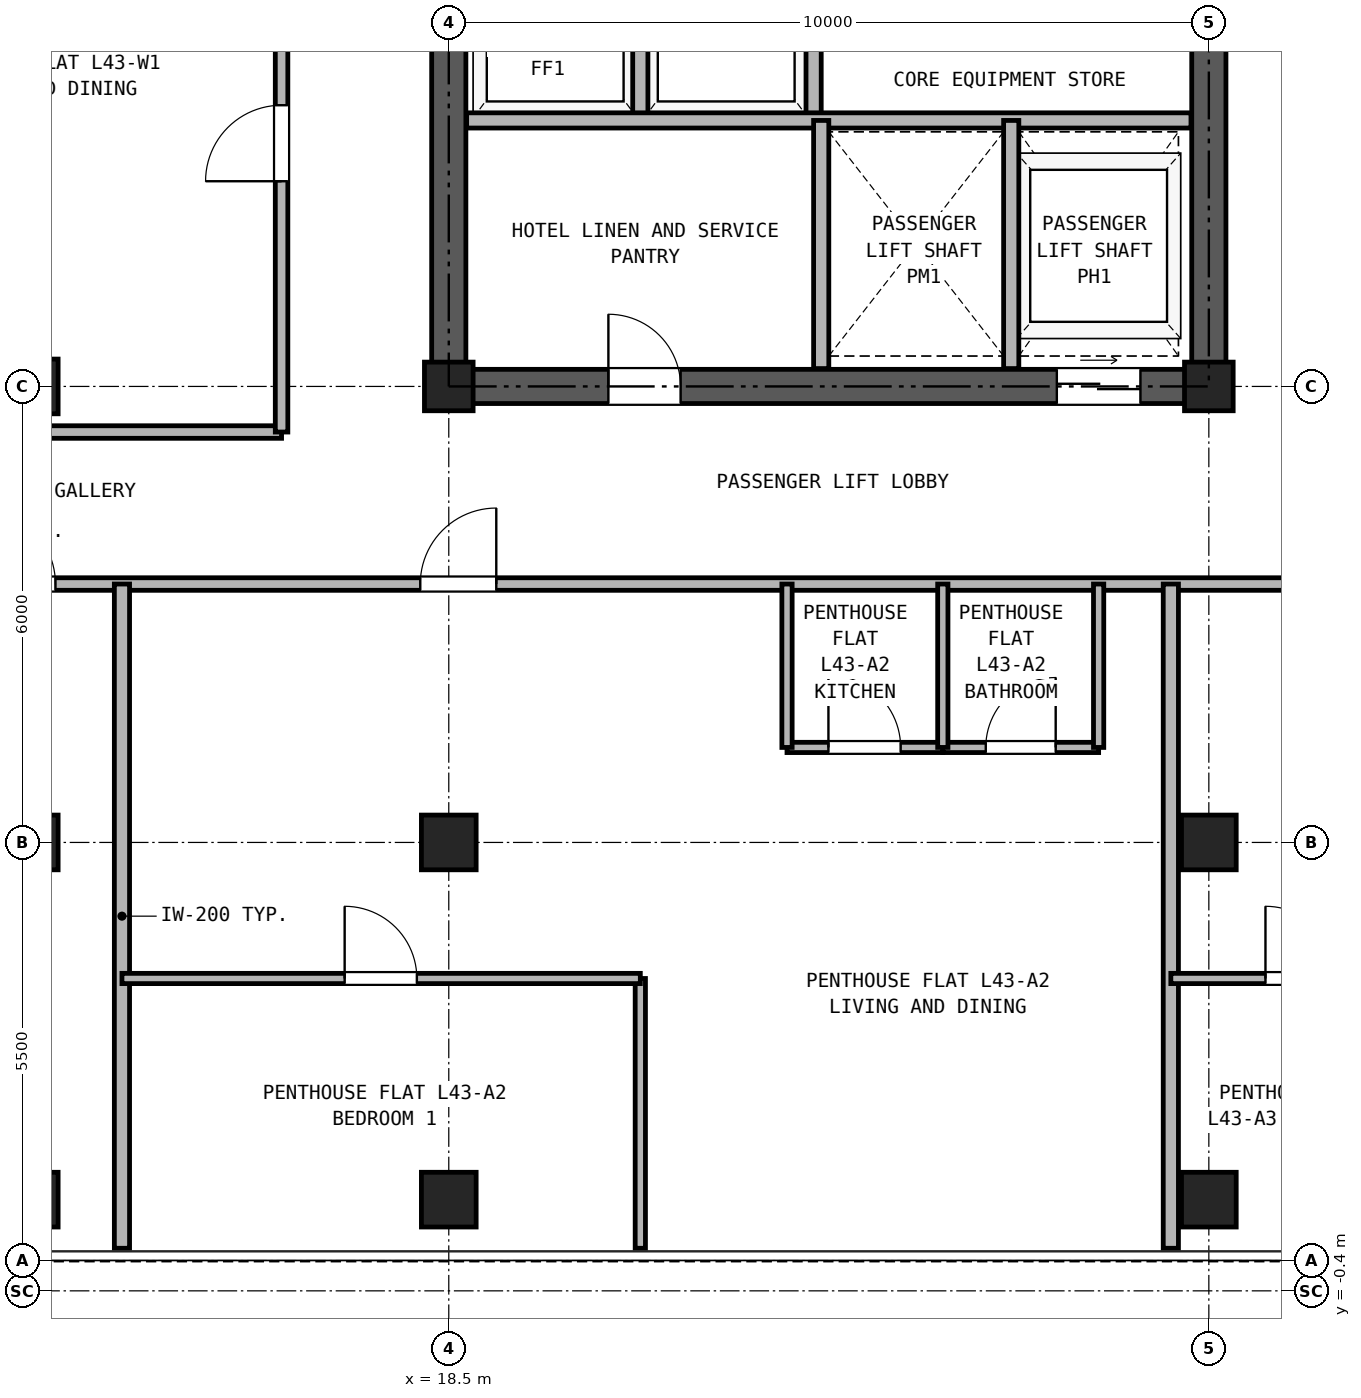
"""IFC4 building model, lengths in metres.
Left out: names, types, materials, properties, quantities, classifications, styles, units other than length and angle.
Written with IfcOpenShell. Run it as: python <this file> out.ifc"""

import sys

from ifc_helpers import new_model, si_unit, direction, frame, frame_2d, origin, origin_2d, place, context, subcontext, project, spatial, rectangle, hollow_rectangle, extrude, source, transform, mapped, element, fill, save


model = new_model("IFC4")
c1 = context("Model", 3, precision=1e-05, world=origin(), true_north=direction((0.0, 1.0)))
c2 = subcontext(c1, "Body", "Model", "MODEL_VIEW")
j1 = project(units=[si_unit("LENGTHUNIT", "METRE"), si_unit("PLANEANGLEUNIT", "RADIAN")], contexts=[c1])
p1 = place(None, origin())
s1 = spatial("IfcSite", under=j1, at=p1, CompositionType="ELEMENT")
p2 = place(p1, origin())
s2 = spatial("IfcBuilding", under=s1, at=p2, CompositionType="ELEMENT")
p3 = place(p2, frame((0.0, 0.0, 156.1)))
s3 = spatial("IfcBuildingStorey", under=s2, at=p3, CompositionType="ELEMENT", Elevation=156.1)
m1 = source(origin(), c2, "Body", "SweptSolid", [
    extrude(hollow_rectangle(XDim=0.72, YDim=0.72, WallThickness=0.04, at=origin_2d()), origin(), (0.0, 0.0, 1.0), 2.95),
])
for number, where, z_axis, x_axis in (
    (1, (13.0, 0.8, 0.0), (0.0, 0.0, 1.0), (1.0, 0.0, 0.0)),
    (2, (18.5, 0.8, 0.0), (0.0, 0.0, 1.0), (1.0, 0.0, 0.0)),
    (3, (28.5, 0.8, 0.0), (0.0, 0.0, 1.0), (1.0, 0.0, 0.0)),
    (4, (13.0, 5.5, 0.0), (0.0, 0.0, 1.0), (1.0, 0.0, 0.0)),
    (5, (13.0, 11.5, 0.0), (0.0, 0.0, 1.0), (1.0, 0.0, 0.0)),
    (6, (18.5, 5.5, 0.0), (0.0, 0.0, 1.0), (1.0, 0.0, 0.0)),
):
    element("IfcColumn", number, at=place(p3, frame(where, z_axis=z_axis, x_axis=x_axis)), inside=s3, PredefinedType="COLUMN", context=c2, shape_type="MappedRepresentation", body=[
        mapped(m1, transform((0.0, 0.0, 0.0), x_axis=(1.0, 0.0, 0.0), y_axis=(0.0, 1.0, 0.0), z_axis=(0.0, 0.0, 1.0), scale=1.0)),
    ])
m2 = source(origin(), c2, "Body", "SweptSolid", [
    extrude(hollow_rectangle(XDim=0.64, YDim=0.64, WallThickness=0.035, at=origin_2d()), origin(), (0.0, 0.0, 1.0), 2.95),
])
p4 = place(p3, frame((18.5, 11.5, 0.0), z_axis=(0.0, 0.0, 1.0), x_axis=(1.0, 0.0, 0.0)))
e7 = element("IfcColumn", 7, at=p4, inside=s3, PredefinedType="COLUMN", context=c2, shape_type="MappedRepresentation", body=[
    mapped(m2, transform((0.0, 0.0, 0.0), x_axis=(1.0, 0.0, 0.0), y_axis=(0.0, 1.0, 0.0), z_axis=(0.0, 0.0, 1.0), scale=1.0)),
])
p5 = place(p3, frame((28.5, 5.5, 0.0), z_axis=(0.0, 0.0, 1.0), x_axis=(1.0, 0.0, 0.0)))
e8 = element("IfcColumn", 8, at=p5, inside=s3, PredefinedType="COLUMN", context=c2, shape_type="MappedRepresentation", body=[
    mapped(m1, transform((0.0, 0.0, 0.0), x_axis=(1.0, 0.0, 0.0), y_axis=(0.0, 1.0, 0.0), z_axis=(0.0, 0.0, 1.0), scale=1.0)),
])
p6 = place(p3, frame((28.5, 11.5, 0.0), z_axis=(0.0, 0.0, 1.0), x_axis=(1.0, 0.0, 0.0)))
e9 = element("IfcColumn", 9, at=p6, inside=s3, PredefinedType="COLUMN", context=c2, shape_type="MappedRepresentation", body=[
    mapped(m2, transform((0.0, 0.0, 0.0), x_axis=(1.0, 0.0, 0.0), y_axis=(0.0, 1.0, 0.0), z_axis=(0.0, 0.0, 1.0), scale=1.0)),
])
p7 = place(p3, frame((18.275, 11.5, 0.0), z_axis=(0.0, 0.0, 1.0), x_axis=(1.0, 0.0, 0.0)))
e10 = element("IfcWall", 10, at=p7, inside=s3, PredefinedType="SHEAR", context=c2, shape_type="SweptSolid", body=[
    extrude(rectangle(XDim=10.45, YDim=0.45, at=frame_2d((5.225, 0.0))), origin(), (0.0, 0.0, 1.0), 2.95),
])
p8 = place(p7, frame((2.325, 0.0, 0.0)))
e11 = element("IfcOpeningElement", 11, at=p8, cuts=e10, PredefinedType="OPENING", context=c2, shape_type="SweptSolid", body=[
    extrude(rectangle(XDim=0.95, YDim=2.15, at=frame_2d((0.475, 1.075))), frame((0.0, 0.235, 0.0), z_axis=(0.0, -1.0, 0.0), x_axis=(1.0, 0.0, 0.0)), (0.0, 0.0, 1.0), 0.47),
])
p9 = place(p7, frame((8.225, 0.0, 0.0)))
e12 = element("IfcOpeningElement", 12, at=p9, cuts=e10, PredefinedType="OPENING", context=c2, shape_type="SweptSolid", body=[
    extrude(rectangle(XDim=1.1, YDim=2.25, at=frame_2d((0.55, 1.125))), frame((0.0, 0.235, 0.0), z_axis=(0.0, -1.0, 0.0), x_axis=(1.0, 0.0, 0.0)), (0.0, 0.0, 1.0), 0.47),
])
p10 = place(p3, frame((18.5, 11.725, 0.0), z_axis=(0.0, 0.0, 1.0), x_axis=(0.0, 1.0, 0.0)))
e13 = element("IfcWall", 13, at=p10, inside=s3, PredefinedType="SHEAR", context=c2, shape_type="SweptSolid", body=[
    extrude(rectangle(XDim=16.8, YDim=0.45, at=frame_2d((8.4, 0.0))), origin(), (0.0, 0.0, 1.0), 2.95),
])
p11 = place(p10, frame((7.425, 0.0, 0.0)))
e14 = element("IfcOpeningElement", 14, at=p11, cuts=e13, PredefinedType="OPENING", context=c2, shape_type="SweptSolid", body=[
    extrude(rectangle(XDim=1.15, YDim=2.2, at=frame_2d((0.575, 1.1))), frame((0.0, 0.235, 0.0), z_axis=(0.0, -1.0, 0.0), x_axis=(1.0, 0.0, 0.0)), (0.0, 0.0, 1.0), 0.47),
])
p12 = place(p3, frame((28.5, 11.725, 0.0), z_axis=(0.0, 0.0, 1.0), x_axis=(0.0, 1.0, 0.0)))
e15 = element("IfcWall", 15, at=p12, inside=s3, PredefinedType="SHEAR", context=c2, shape_type="SweptSolid", body=[
    extrude(rectangle(XDim=16.8, YDim=0.45, at=frame_2d((8.4, 0.0))), origin(), (0.0, 0.0, 1.0), 2.95),
])
p13 = place(p12, frame((7.425, 0.0, 0.0)))
e16 = element("IfcOpeningElement", 16, at=p13, cuts=e15, PredefinedType="OPENING", context=c2, shape_type="SweptSolid", body=[
    extrude(rectangle(XDim=1.15, YDim=2.2, at=frame_2d((0.575, 1.1))), frame((0.0, 0.235, 0.0), z_axis=(0.0, -1.0, 0.0), x_axis=(1.0, 0.0, 0.0)), (0.0, 0.0, 1.0), 0.47),
])
for number, where, z_axis, x_axis in (
    (17, (21.02, 15.0, 0.0), (0.0, 0.0, 1.0), (0.0, 1.0, 0.0)),
    (18, (23.3, 15.0, 0.0), (0.0, 0.0, 1.0), (0.0, 1.0, 0.0)),
):
    element("IfcWall", number, at=place(p3, frame(where, z_axis=z_axis, x_axis=x_axis)), inside=s3, PredefinedType="PARTITIONING", context=c2, shape_type="SweptSolid", body=[
        extrude(rectangle(XDim=3.0, YDim=0.2, at=frame_2d((1.5, 0.0))), origin(), (0.0, 0.0, 1.0), 2.95),
    ])
p14 = place(p3, frame((18.735, 15.0, 0.0), z_axis=(0.0, 0.0, 1.0), x_axis=(1.0, 0.0, 0.0)))
e19 = element("IfcWall", 19, at=p14, inside=s3, PredefinedType="PARTITIONING", context=c2, shape_type="SweptSolid", body=[
    extrude(rectangle(XDim=9.53, YDim=0.2, at=frame_2d((4.765, 0.0))), origin(), (0.0, 0.0, 1.0), 2.95),
])
for number, where, z_axis, x_axis in (
    (20, (23.4, 11.735, 0.0), (0.0, 0.0, 1.0), (0.0, 1.0, 0.0)),
    (21, (25.9, 11.735, 0.0), (0.0, 0.0, 1.0), (0.0, 1.0, 0.0)),
):
    element("IfcWall", number, at=place(p3, frame(where, z_axis=z_axis, x_axis=x_axis)), inside=s3, PredefinedType="PARTITIONING", context=c2, shape_type="SweptSolid", body=[
        extrude(rectangle(XDim=3.265, YDim=0.2, at=frame_2d((1.632, 0.0))), origin(), (0.0, 0.0, 1.0), 2.95),
    ])
p15 = place(p3, frame((0.16, 8.9, 0.0), z_axis=(0.0, 0.0, 1.0), x_axis=(1.0, 0.0, 0.0)))
e22 = element("IfcWall", 22, at=p15, inside=s3, PredefinedType="PARTITIONING", context=c2, shape_type="SweptSolid", body=[
    extrude(rectangle(XDim=41.48, YDim=0.165, at=frame_2d((20.74, 0.0))), origin(), (0.0, 0.0, 1.0), 2.95),
])
p16 = place(p15, frame((12.165, 0.0, 0.0)))
e23 = element("IfcOpeningElement", 23, at=p16, cuts=e22, PredefinedType="OPENING", context=c2, shape_type="SweptSolid", body=[
    extrude(rectangle(XDim=1.0, YDim=2.15, at=frame_2d((0.5, 1.075))), frame((0.0, 0.093, 0.0), z_axis=(0.0, -1.0, 0.0), x_axis=(1.0, 0.0, 0.0)), (0.0, 0.0, 1.0), 0.185),
])
p17 = place(p15, frame((17.965, 0.0, 0.0)))
e24 = element("IfcOpeningElement", 24, at=p17, cuts=e22, PredefinedType="OPENING", context=c2, shape_type="SweptSolid", body=[
    extrude(rectangle(XDim=1.0, YDim=2.15, at=frame_2d((0.5, 1.075))), frame((0.0, 0.093, 0.0), z_axis=(0.0, -1.0, 0.0), x_axis=(1.0, 0.0, 0.0)), (0.0, 0.0, 1.0), 0.185),
])
p18 = place(p15, frame((31.115, 0.0, 0.0)))
e25 = element("IfcOpeningElement", 25, at=p18, cuts=e22, PredefinedType="OPENING", context=c2, shape_type="SweptSolid", body=[
    extrude(rectangle(XDim=1.0, YDim=2.15, at=frame_2d((0.5, 1.075))), frame((0.0, 0.093, 0.0), z_axis=(0.0, -1.0, 0.0), x_axis=(1.0, 0.0, 0.0)), (0.0, 0.0, 1.0), 0.185),
])
p19 = place(p3, frame((7.6, 10.9, 0.0), z_axis=(0.0, 0.0, 1.0), x_axis=(1.0, 0.0, 0.0)))
e26 = element("IfcWall", 26, at=p19, inside=s3, PredefinedType="PARTITIONING", context=c2, shape_type="SweptSolid", body=[
    extrude(rectangle(XDim=8.7, YDim=0.165, at=frame_2d((4.35, 0.0))), origin(), (0.0, 0.0, 1.0), 2.95),
])
p20 = place(p3, frame((16.3, 10.9, 0.0), z_axis=(0.0, 0.0, 1.0), x_axis=(0.0, 1.0, 0.0)))
e27 = element("IfcWall", 27, at=p20, inside=s3, PredefinedType="PARTITIONING", context=c2, shape_type="SweptSolid", body=[
    extrude(rectangle(XDim=24.24, YDim=0.165, at=frame_2d((12.12, 0.0))), origin(), (0.0, 0.0, 1.0), 2.95),
])
p21 = place(p20, frame((3.3, 0.0, 0.0)))
e28 = element("IfcOpeningElement", 28, at=p21, cuts=e27, PredefinedType="OPENING", context=c2, shape_type="SweptSolid", body=[
    extrude(rectangle(XDim=1.0, YDim=2.15, at=frame_2d((0.5, 1.075))), frame((0.0, 0.093, 0.0), z_axis=(0.0, -1.0, 0.0), x_axis=(1.0, 0.0, 0.0)), (0.0, 0.0, 1.0), 0.185),
])
p22 = place(p20, frame((11.25, 0.0, 0.0)))
e29 = element("IfcOpeningElement", 29, at=p22, cuts=e27, PredefinedType="OPENING", context=c2, shape_type="SweptSolid", body=[
    extrude(rectangle(XDim=1.0, YDim=2.15, at=frame_2d((0.5, 1.075))), frame((0.0, 0.093, 0.0), z_axis=(0.0, -1.0, 0.0), x_axis=(1.0, 0.0, 0.0)), (0.0, 0.0, 1.0), 0.185),
])
p23 = place(p20, frame((17.2, 0.0, 0.0)))
e30 = element("IfcOpeningElement", 30, at=p23, cuts=e27, PredefinedType="OPENING", context=c2, shape_type="SweptSolid", body=[
    extrude(rectangle(XDim=1.0, YDim=2.15, at=frame_2d((0.5, 1.075))), frame((0.0, 0.093, 0.0), z_axis=(0.0, -1.0, 0.0), x_axis=(1.0, 0.0, 0.0)), (0.0, 0.0, 1.0), 0.185),
])
p24 = place(p3, frame((14.2, 0.16, 0.0), z_axis=(0.0, 0.0, 1.0), x_axis=(0.0, 1.0, 0.0)))
e31 = element("IfcWall", 31, at=p24, inside=s3, PredefinedType="PARTITIONING", context=c2, shape_type="SweptSolid", body=[
    extrude(rectangle(XDim=8.74, YDim=0.2, at=frame_2d((4.37, 0.0))), origin(), (0.0, 0.0, 1.0), 2.95),
])
p25 = place(p3, frame((22.95, 6.75, 0.0), z_axis=(0.0, 0.0, 1.0), x_axis=(1.0, 0.0, 0.0)))
e32 = element("IfcWall", 32, at=p25, inside=s3, PredefinedType="PARTITIONING", context=c2, shape_type="SweptSolid", body=[
    extrude(rectangle(XDim=2.05, YDim=0.135, at=frame_2d((1.025, 0.0))), origin(), (0.0, 0.0, 1.0), 2.95),
])
p26 = place(p25, frame((0.545, 0.0, 0.0)))
e33 = element("IfcOpeningElement", 33, at=p26, cuts=e32, PredefinedType="OPENING", context=c2, shape_type="SweptSolid", body=[
    extrude(rectangle(XDim=0.95, YDim=2.15, at=frame_2d((0.475, 1.075))), frame((0.0, 0.077, 0.0), z_axis=(0.0, -1.0, 0.0), x_axis=(1.0, 0.0, 0.0)), (0.0, 0.0, 1.0), 0.155),
])
p27 = place(p3, frame((25.0, 6.75, 0.0), z_axis=(0.0, 0.0, 1.0), x_axis=(1.0, 0.0, 0.0)))
e34 = element("IfcWall", 34, at=p27, inside=s3, PredefinedType="PARTITIONING", context=c2, shape_type="SweptSolid", body=[
    extrude(rectangle(XDim=2.05, YDim=0.135, at=frame_2d((1.025, 0.0))), origin(), (0.0, 0.0, 1.0), 2.95),
])
p28 = place(p27, frame((0.565, 0.0, 0.0)))
e35 = element("IfcOpeningElement", 35, at=p28, cuts=e34, PredefinedType="OPENING", context=c2, shape_type="SweptSolid", body=[
    extrude(rectangle(XDim=0.92, YDim=2.1, at=frame_2d((0.46, 1.05))), frame((0.0, 0.077, 0.0), z_axis=(0.0, -1.0, 0.0), x_axis=(1.0, 0.0, 0.0)), (0.0, 0.0, 1.0), 0.155),
])
for number, where, z_axis, x_axis in (
    (36, (22.95, 6.75, 0.0), (0.0, 0.0, 1.0), (0.0, 1.0, 0.0)),
    (37, (25.0, 6.75, 0.0), (0.0, 0.0, 1.0), (0.0, 1.0, 0.0)),
    (38, (27.05, 6.75, 0.0), (0.0, 0.0, 1.0), (0.0, 1.0, 0.0)),
):
    element("IfcWall", number, at=place(p3, frame(where, z_axis=z_axis, x_axis=x_axis)), inside=s3, PredefinedType="PARTITIONING", context=c2, shape_type="SweptSolid", body=[
        extrude(rectangle(XDim=2.15, YDim=0.135, at=frame_2d((1.075, 0.0))), origin(), (0.0, 0.0, 1.0), 2.95),
    ])
p29 = place(p3, frame((21.02, 0.16, 0.0), z_axis=(0.0, 0.0, 1.0), x_axis=(0.0, 1.0, 0.0)))
e39 = element("IfcWall", 39, at=p29, inside=s3, PredefinedType="PARTITIONING", context=c2, shape_type="SweptSolid", body=[
    extrude(rectangle(XDim=3.55, YDim=0.135, at=frame_2d((1.775, 0.0))), origin(), (0.0, 0.0, 1.0), 2.95),
])
p30 = place(p3, frame((14.2, 3.71, 0.0), z_axis=(0.0, 0.0, 1.0), x_axis=(1.0, 0.0, 0.0)))
e40 = element("IfcWall", 40, at=p30, inside=s3, PredefinedType="PARTITIONING", context=c2, shape_type="SweptSolid", body=[
    extrude(rectangle(XDim=6.82, YDim=0.135, at=frame_2d((3.41, 0.0))), origin(), (0.0, 0.0, 1.0), 2.95),
])
p31 = place(p30, frame((2.93, 0.0, 0.0)))
e41 = element("IfcOpeningElement", 41, at=p31, cuts=e40, PredefinedType="OPENING", context=c2, shape_type="SweptSolid", body=[
    extrude(rectangle(XDim=0.95, YDim=2.15, at=frame_2d((0.475, 1.075))), frame((0.0, 0.077, 0.0), z_axis=(0.0, -1.0, 0.0), x_axis=(1.0, 0.0, 0.0)), (0.0, 0.0, 1.0), 0.155),
])
p32 = place(p3, frame((28.0, 0.16, 0.0), z_axis=(0.0, 0.0, 1.0), x_axis=(0.0, 1.0, 0.0)))
e42 = element("IfcWall", 42, at=p32, inside=s3, PredefinedType="PARTITIONING", context=c2, shape_type="SweptSolid", body=[
    extrude(rectangle(XDim=8.74, YDim=0.2, at=frame_2d((4.37, 0.0))), origin(), (0.0, 0.0, 1.0), 2.95),
])
p33 = place(p3, frame((28.0, 3.71, 0.0), z_axis=(0.0, 0.0, 1.0), x_axis=(1.0, 0.0, 0.0)))
e43 = element("IfcWall", 43, at=p33, inside=s3, PredefinedType="PARTITIONING", context=c2, shape_type="SweptSolid", body=[
    extrude(rectangle(XDim=3.45, YDim=0.135, at=frame_2d((1.725, 0.0))), origin(), (0.0, 0.0, 1.0), 2.95),
])
p34 = place(p33, frame((1.245, 0.0, 0.0)))
e44 = element("IfcOpeningElement", 44, at=p34, cuts=e43, PredefinedType="OPENING", context=c2, shape_type="SweptSolid", body=[
    extrude(rectangle(XDim=0.95, YDim=2.15, at=frame_2d((0.475, 1.075))), frame((0.0, 0.077, 0.0), z_axis=(0.0, -1.0, 0.0), x_axis=(1.0, 0.0, 0.0)), (0.0, 0.0, 1.0), 0.155),
])
p35 = place(p8, frame((0.95, 0.0, 0.0), z_axis=(0.0, 0.0, 1.0), x_axis=(-1.0, 0.0, 0.0)))
e45 = element("IfcDoor", 45, at=p35, inside=s3, OperationType="SINGLE_SWING_LEFT", PredefinedType="DOOR", context=c2, shape_type="SweptSolid", body=[
    extrude(rectangle(XDim=0.95, YDim=2.15, at=frame_2d((0.475, 1.075))), frame((0.0, 0.025, 0.0), z_axis=(0.0, -1.0, 0.0), x_axis=(1.0, 0.0, 0.0)), (0.0, 0.0, 1.0), 0.05),
])
fill(e11, e45)
p36 = place(p9, frame((1.1, 0.0, 0.0), z_axis=(0.0, 0.0, 1.0), x_axis=(-1.0, 0.0, 0.0)))
e46 = element("IfcDoor", 46, at=p36, inside=s3, OperationType="DOUBLE_DOOR_SLIDING", PredefinedType="DOOR", context=c2, shape_type="SweptSolid", body=[
    extrude(rectangle(XDim=1.1, YDim=2.25, at=frame_2d((0.55, 1.125))), frame((0.0, 0.025, 0.0), z_axis=(0.0, -1.0, 0.0), x_axis=(1.0, 0.0, 0.0)), (0.0, 0.0, 1.0), 0.05),
])
fill(e12, e46)
p37 = place(p16, frame((1.0, 0.0, 0.0), z_axis=(0.0, 0.0, 1.0), x_axis=(-1.0, 0.0, 0.0)))
e47 = element("IfcDoor", 47, at=p37, inside=s3, OperationType="SINGLE_SWING_LEFT", PredefinedType="DOOR", context=c2, shape_type="SweptSolid", body=[
    extrude(rectangle(XDim=1.0, YDim=2.15, at=frame_2d((0.5, 1.075))), frame((0.0, 0.025, 0.0), z_axis=(0.0, -1.0, 0.0), x_axis=(1.0, 0.0, 0.0)), (0.0, 0.0, 1.0), 0.05),
])
fill(e23, e47)
p38 = place(p26, origin())
e48 = element("IfcDoor", 48, at=p38, inside=s3, OperationType="SINGLE_SWING_LEFT", PredefinedType="DOOR", context=c2, shape_type="SweptSolid", body=[
    extrude(rectangle(XDim=0.95, YDim=2.15, at=frame_2d((0.475, 1.075))), frame((0.0, 0.025, 0.0), z_axis=(0.0, -1.0, 0.0), x_axis=(1.0, 0.0, 0.0)), (0.0, 0.0, 1.0), 0.05),
])
fill(e33, e48)
p39 = place(p28, origin())
e49 = element("IfcDoor", 49, at=p39, inside=s3, OperationType="SINGLE_SWING_RIGHT", PredefinedType="DOOR", context=c2, shape_type="SweptSolid", body=[
    extrude(rectangle(XDim=0.92, YDim=2.1, at=frame_2d((0.46, 1.05))), frame((0.0, 0.025, 0.0), z_axis=(0.0, -1.0, 0.0), x_axis=(1.0, 0.0, 0.0)), (0.0, 0.0, 1.0), 0.05),
])
fill(e35, e49)
p40 = place(p31, frame((0.95, 0.0, 0.0), z_axis=(0.0, 0.0, 1.0), x_axis=(-1.0, 0.0, 0.0)))
e50 = element("IfcDoor", 50, at=p40, inside=s3, OperationType="SINGLE_SWING_LEFT", PredefinedType="DOOR", context=c2, shape_type="SweptSolid", body=[
    extrude(rectangle(XDim=0.95, YDim=2.15, at=frame_2d((0.475, 1.075))), frame((0.0, 0.025, 0.0), z_axis=(0.0, -1.0, 0.0), x_axis=(1.0, 0.0, 0.0)), (0.0, 0.0, 1.0), 0.05),
])
fill(e41, e50)
p41 = place(p17, frame((1.0, 0.0, 0.0), z_axis=(0.0, 0.0, 1.0), x_axis=(-1.0, 0.0, 0.0)))
e51 = element("IfcDoor", 51, at=p41, inside=s3, OperationType="SINGLE_SWING_RIGHT", PredefinedType="DOOR", context=c2, shape_type="SweptSolid", body=[
    extrude(rectangle(XDim=1.0, YDim=2.15, at=frame_2d((0.5, 1.075))), frame((0.0, 0.025, 0.0), z_axis=(0.0, -1.0, 0.0), x_axis=(1.0, 0.0, 0.0)), (0.0, 0.0, 1.0), 0.05),
])
fill(e24, e51)
p42 = place(p34, frame((0.95, 0.0, 0.0), z_axis=(0.0, 0.0, 1.0), x_axis=(-1.0, 0.0, 0.0)))
e52 = element("IfcDoor", 52, at=p42, inside=s3, OperationType="SINGLE_SWING_LEFT", PredefinedType="DOOR", context=c2, shape_type="SweptSolid", body=[
    extrude(rectangle(XDim=0.95, YDim=2.15, at=frame_2d((0.475, 1.075))), frame((0.0, 0.025, 0.0), z_axis=(0.0, -1.0, 0.0), x_axis=(1.0, 0.0, 0.0)), (0.0, 0.0, 1.0), 0.05),
])
fill(e44, e52)
p43 = place(p21, origin())
e53 = element("IfcDoor", 53, at=p43, inside=s3, OperationType="SINGLE_SWING_LEFT", PredefinedType="DOOR", context=c2, shape_type="SweptSolid", body=[
    extrude(rectangle(XDim=1.0, YDim=2.15, at=frame_2d((0.5, 1.075))), frame((0.0, 0.025, 0.0), z_axis=(0.0, -1.0, 0.0), x_axis=(1.0, 0.0, 0.0)), (0.0, 0.0, 1.0), 0.05),
])
fill(e28, e53)
save(model, sys.argv[1])
